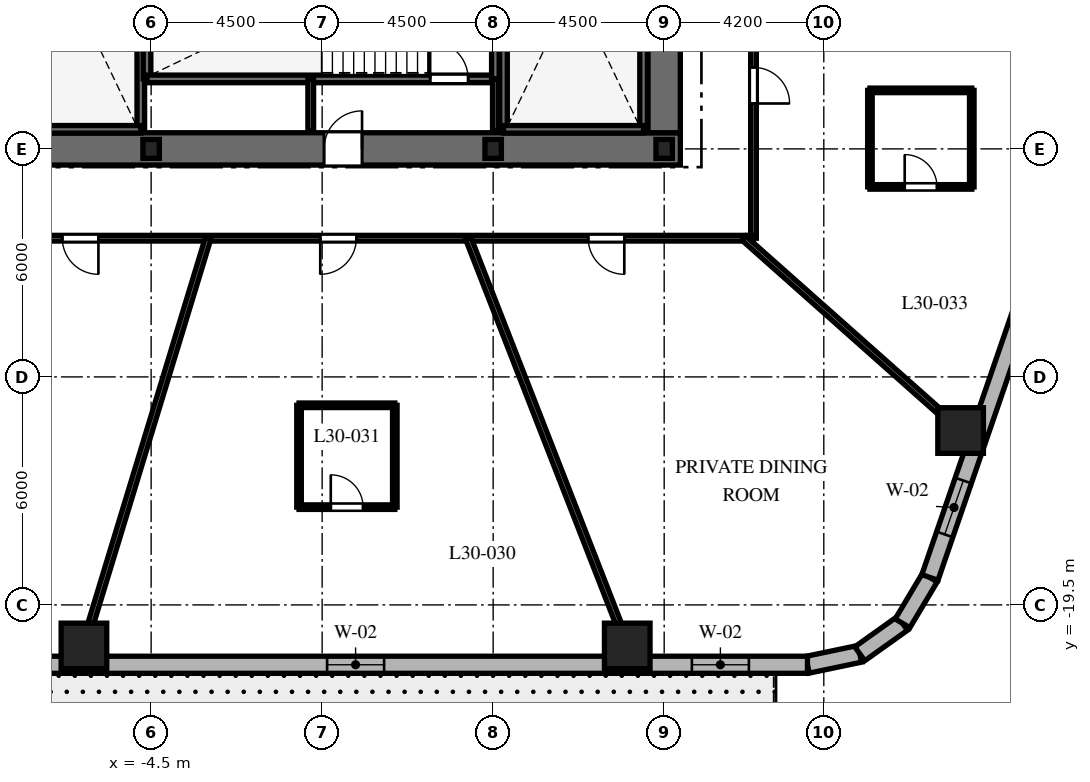
"""IFC4 building model, lengths in metres.
Left out: names, types, materials, properties, quantities, classifications, styles, units other than length and angle.
Written with IfcOpenShell. Run it as: python <this file> out.ifc"""

import sys

from ifc_helpers import new_model, si_unit, direction, frame, frame_2d, origin, origin_2d, place, context, subcontext, project, spatial, rectangle, i_section, extrude, element, fill, save


model = new_model("IFC4")
c1 = context("Model", 3, precision=1e-05, world=origin(), true_north=direction((0.0, 1.0)))
c2 = subcontext(c1, "Body", "Model", "MODEL_VIEW")
j1 = project(units=[si_unit("LENGTHUNIT", "METRE"), si_unit("PLANEANGLEUNIT", "RADIAN")], contexts=[c1])
p1 = place(None, origin())
s1 = spatial("IfcSite", under=j1, at=p1, CompositionType="ELEMENT")
p2 = place(p1, origin())
s2 = spatial("IfcBuilding", under=s1, at=p2, CompositionType="ELEMENT")
p3 = place(p2, frame((0.0, 0.0, 124.7)))
s3 = spatial("IfcBuildingStorey", under=s2, at=p3, CompositionType="ELEMENT", Elevation=124.7)
p4 = place(p3, frame((-9.425, -7.5, 0.0), z_axis=(0.0, 0.0, 1.0), x_axis=(1.0, 0.0, 0.0)))
e1 = element("IfcWall", 1, at=p4, inside=s3, PredefinedType="SHEAR", context=c2, shape_type="SweptSolid", body=[
    extrude(rectangle(XDim=18.85, YDim=0.85, at=frame_2d((9.425, 0.0))), origin(), (0.0, 0.0, 1.0), 3.7),
])
p5 = place(p4, frame((9.475, 0.0, 0.0)))
e2 = element("IfcOpeningElement", 2, at=p5, cuts=e1, PredefinedType="OPENING", context=c2, shape_type="SweptSolid", body=[
    extrude(rectangle(XDim=1.0, YDim=2.15, at=frame_2d((0.5, 1.075))), frame((0.0, 0.435, 0.0), z_axis=(0.0, -1.0, 0.0), x_axis=(1.0, 0.0, 0.0)), (0.0, 0.0, 1.0), 0.87),
])
p6 = place(p3, frame((9.0, -7.075, 0.0), z_axis=(0.0, 0.0, 1.0), x_axis=(0.0, 1.0, 0.0)))
e3 = element("IfcWall", 3, at=p6, inside=s3, PredefinedType="SHEAR", context=c2, shape_type="SweptSolid", body=[
    extrude(rectangle(XDim=14.15, YDim=0.85, at=frame_2d((7.075, 0.0))), origin(), (0.0, 0.0, 1.0), 3.7),
])
p7 = place(p6, frame((10.2, 0.0, 0.0)))
e4 = element("IfcOpeningElement", 4, at=p7, cuts=e3, PredefinedType="OPENING", context=c2, shape_type="SweptSolid", body=[
    extrude(rectangle(XDim=1.05, YDim=2.15, at=frame_2d((0.525, 1.075))), frame((0.0, 0.435, 0.0), z_axis=(0.0, -1.0, 0.0), x_axis=(1.0, 0.0, 0.0)), (0.0, 0.0, 1.0), 0.87),
])
p8 = place(p3, frame((-4.772, -6.985, 0.0), z_axis=(0.0, 0.0, 1.0), x_axis=(0.0, 1.0, 0.0)))
e5 = element("IfcWall", 5, at=p8, inside=s3, PredefinedType="SHEAR", context=c2, shape_type="SweptSolid", body=[
    extrude(rectangle(XDim=9.143, YDim=0.2, at=frame_2d((4.572, 0.0))), origin(), (0.0, 0.0, 1.0), 3.7),
])
p9 = place(p3, frame((-8.458, -6.985, 0.0), z_axis=(0.0, 0.0, 1.0), x_axis=(1.0, 0.0, 0.0)))
e6 = element("IfcWall", 6, at=p9, inside=s3, PredefinedType="SHEAR", context=c2, shape_type="SweptSolid", body=[
    extrude(rectangle(XDim=3.686, YDim=0.2, at=frame_2d((1.843, 0.0))), origin(), (0.0, 0.0, 1.0), 3.7),
])
for number, where, z_axis, x_axis in (
    (7, (4.772, -6.985, 0.0), (0.0, 0.0, 1.0), (0.0, 1.0, 0.0)),
    (8, (8.458, -6.985, 0.0), (0.0, 0.0, 1.0), (0.0, 1.0, 0.0)),
):
    element("IfcWall", number, at=place(p3, frame(where, z_axis=z_axis, x_axis=x_axis)), inside=s3, PredefinedType="SHEAR", context=c2, shape_type="SweptSolid", body=[
        extrude(rectangle(XDim=9.143, YDim=0.2, at=frame_2d((4.572, 0.0))), origin(), (0.0, 0.0, 1.0), 3.7),
    ])
for number, where, z_axis, x_axis in (
    (9, (4.772, -6.985, 0.0), (0.0, 0.0, 1.0), (1.0, 0.0, 0.0)),
    (10, (-4.608, -5.658, 0.0), (0.0, 0.0, 1.0), (0.0, 1.0, 0.0)),
):
    element("IfcWall", number, at=place(p3, frame(where, z_axis=z_axis, x_axis=x_axis)), inside=s3, PredefinedType="SHEAR", context=c2, shape_type="SweptSolid", body=[
        extrude(rectangle(XDim=3.686, YDim=0.2, at=frame_2d((1.843, 0.0))), origin(), (0.0, 0.0, 1.0), 3.7),
    ])
p10 = place(p3, frame((-4.608, -5.658, 0.0), z_axis=(0.0, 0.0, 1.0), x_axis=(1.0, 0.0, 0.0)))
e11 = element("IfcWall", 11, at=p10, inside=s3, PredefinedType="SHEAR", context=c2, shape_type="SweptSolid", body=[
    extrude(rectangle(XDim=9.166, YDim=0.2, at=frame_2d((4.583, 0.0))), origin(), (0.0, 0.0, 1.0), 3.7),
])
p11 = place(p10, frame((7.45, 0.0, 0.0)))
e12 = element("IfcOpeningElement", 12, at=p11, cuts=e11, PredefinedType="OPENING", context=c2, shape_type="SweptSolid", body=[
    extrude(rectangle(XDim=1.0, YDim=2.15, at=frame_2d((0.5, 1.075))), frame((0.0, 0.11, 0.0), z_axis=(0.0, -1.0, 0.0), x_axis=(1.0, 0.0, 0.0)), (0.0, 0.0, 1.0), 0.22),
])
p12 = place(p3, frame((4.558, -5.658, 0.0), z_axis=(0.0, 0.0, 1.0), x_axis=(0.0, 1.0, 0.0)))
e13 = element("IfcWall", 13, at=p12, inside=s3, PredefinedType="SHEAR", context=c2, shape_type="SweptSolid", body=[
    extrude(rectangle(XDim=3.686, YDim=0.2, at=frame_2d((1.843, 0.0))), origin(), (0.0, 0.0, 1.0), 3.7),
])
for number, where, z_axis, x_axis in (
    (14, (-4.5, -7.5, 0.0), (0.0, 0.0, 1.0), (1.0, 0.0, 0.0)),
    (15, (4.5, -7.5, 0.0), (0.0, 0.0, 1.0), (1.0, 0.0, 0.0)),
    (16, (9.0, -7.5, 0.0), (0.0, 0.0, 1.0), (1.0, 0.0, 0.0)),
):
    element("IfcColumn", number, at=place(p3, frame(where, z_axis=z_axis, x_axis=x_axis)), inside=s3, PredefinedType="COLUMN", context=c2, shape_type="SweptSolid", body=[
        extrude(i_section(OverallWidth=0.432, OverallDepth=0.498, WebThickness=0.056, FlangeThickness=0.089, at=origin_2d()), origin(), (0.0, 0.0, 1.0), 3.7),
    ])
for number, where, z_axis, x_axis in (
    (17, (-6.268, -20.58, 0.0), (0.0, 0.0, 1.0), (1.0, 0.0, 0.0)),
    (18, (8.028, -20.58, 0.0), (0.0, 0.0, 1.0), (1.0, 0.0, 0.0)),
    (19, (16.8, -14.911, 0.0), (0.0, 0.0, 1.0), (1.0, 0.0, 0.0)),
):
    element("IfcColumn", number, at=place(p3, frame(where, z_axis=z_axis, x_axis=x_axis)), inside=s3, PredefinedType="COLUMN", context=c2, shape_type="SweptSolid", body=[
        extrude(rectangle(XDim=1.2, YDim=1.2, at=origin_2d()), origin(), (0.0, 0.0, 1.0), 3.7),
    ])
p13 = place(p3, frame((12.771, -21.075, 0.0), z_axis=(0.0, 0.0, 1.0), x_axis=(0.97874281988, 0.205091424819, 0.0)))
e20 = element("IfcWall", 20, at=p13, inside=s3, PredefinedType="SOLIDWALL", context=c2, shape_type="SweptSolid", body=[
    extrude(rectangle(XDim=1.406, YDim=0.45, at=frame_2d((0.703, 0.0))), origin(), (0.0, 0.0, 1.0), 3.4),
])
p14 = place(p3, frame((14.146, -20.787, 0.0), z_axis=(0.0, 0.0, 1.0), x_axis=(0.814162929117, 0.580636482536, 0.0)))
e21 = element("IfcWall", 21, at=p14, inside=s3, PredefinedType="SOLIDWALL", context=c2, shape_type="SweptSolid", body=[
    extrude(rectangle(XDim=1.382, YDim=0.45, at=frame_2d((0.691, 0.0))), origin(), (0.0, 0.0, 1.0), 3.4),
])
p15 = place(p3, frame((15.272, -19.984, 0.0), z_axis=(0.0, 0.0, 1.0), x_axis=(0.512579347361, 0.858639862025, 0.0)))
e22 = element("IfcWall", 22, at=p15, inside=s3, PredefinedType="SOLIDWALL", context=c2, shape_type="SweptSolid", body=[
    extrude(rectangle(XDim=1.406, YDim=0.45, at=frame_2d((0.703, 0.0))), origin(), (0.0, 0.0, 1.0), 3.4),
])
p16 = place(p3, frame((-11.012, -21.075, 0.0), z_axis=(0.0, 0.0, 1.0), x_axis=(1.0, 0.0, 0.0)))
e23 = element("IfcWall", 23, at=p16, inside=s3, PredefinedType="SOLIDWALL", context=c2, shape_type="SweptSolid", body=[
    extrude(rectangle(XDim=23.782, YDim=0.45, at=frame_2d((11.891, 0.0))), origin(), (0.0, 0.0, 1.0), 3.4),
])
p17 = place(p16, frame((2.473, 0.0, 0.0)))
e24 = element("IfcOpeningElement", 24, at=p17, cuts=e23, PredefinedType="OPENING", context=c2, shape_type="SweptSolid", body=[
    extrude(rectangle(XDim=1.0, YDim=2.15, at=frame_2d((0.5, 1.075))), frame((0.0, 0.235, 0.0), z_axis=(0.0, -1.0, 0.0), x_axis=(1.0, 0.0, 0.0)), (0.0, 0.0, 1.0), 0.47),
])
p18 = place(p16, frame((11.142, 0.0, 0.8)))
e25 = element("IfcOpeningElement", 25, at=p18, cuts=e23, PredefinedType="OPENING", context=c2, shape_type="SweptSolid", body=[
    extrude(rectangle(XDim=1.5, YDim=1.8, at=frame_2d((0.75, 0.9))), frame((0.0, 0.235, 0.0), z_axis=(0.0, -1.0, 0.0), x_axis=(1.0, 0.0, 0.0)), (0.0, 0.0, 1.0), 0.47),
])
p19 = place(p16, frame((20.741, 0.0, 0.8)))
e26 = element("IfcOpeningElement", 26, at=p19, cuts=e23, PredefinedType="OPENING", context=c2, shape_type="SweptSolid", body=[
    extrude(rectangle(XDim=1.5, YDim=1.8, at=frame_2d((0.75, 0.9))), frame((0.0, 0.235, 0.0), z_axis=(0.0, -1.0, 0.0), x_axis=(1.0, 0.0, 0.0)), (0.0, 0.0, 1.0), 0.47),
])
p20 = place(p3, frame((15.992, -18.777, 0.0), z_axis=(0.0, 0.0, 1.0), x_axis=(0.325606988926, 0.945505202927, 0.0)))
e27 = element("IfcWall", 27, at=p20, inside=s3, PredefinedType="SOLIDWALL", context=c2, shape_type="SweptSolid", body=[
    extrude(rectangle(XDim=19.669, YDim=0.45, at=frame_2d((9.835, 0.0))), origin(), (0.0, 0.0, 1.0), 3.4),
])
p21 = place(p20, frame((1.197, 0.0, 0.8)))
e28 = element("IfcOpeningElement", 28, at=p21, cuts=e27, PredefinedType="OPENING", context=c2, shape_type="SweptSolid", body=[
    extrude(rectangle(XDim=1.5, YDim=1.8, at=frame_2d((0.75, 0.9))), frame((0.0, 0.235, 0.0), z_axis=(0.0, -1.0, 0.0), x_axis=(1.0, 0.0, 0.0)), (0.0, 0.0, 1.0), 0.47),
])
p22 = place(p20, frame((9.03, 0.0, 0.8)))
e29 = element("IfcOpeningElement", 29, at=p22, cuts=e27, PredefinedType="OPENING", context=c2, shape_type="SweptSolid", body=[
    extrude(rectangle(XDim=1.5, YDim=1.8, at=frame_2d((0.75, 0.9))), frame((0.0, 0.235, 0.0), z_axis=(0.0, -1.0, 0.0), x_axis=(1.0, 0.0, 0.0)), (0.0, 0.0, 1.0), 0.47),
])
p23 = place(p20, frame((16.918, 0.0, 0.8)))
e30 = element("IfcOpeningElement", 30, at=p23, cuts=e27, PredefinedType="OPENING", context=c2, shape_type="SweptSolid", body=[
    extrude(rectangle(XDim=1.5, YDim=1.8, at=frame_2d((0.75, 0.9))), frame((0.0, 0.235, 0.0), z_axis=(0.0, -1.0, 0.0), x_axis=(1.0, 0.0, 0.0)), (0.0, 0.0, 1.0), 0.47),
])
for number, where, z_axis, x_axis in (
    (31, (-0.3, -7.02, 0.0), (0.0, 0.0, 1.0), (0.0, 1.0, 0.0)),
    (32, (4.558, -7.02, 0.0), (0.0, 0.0, 1.0), (0.0, 1.0, 0.0)),
):
    element("IfcWall", number, at=place(p3, frame(where, z_axis=z_axis, x_axis=x_axis)), inside=s3, PredefinedType="PARTITIONING", context=c2, shape_type="SweptSolid", body=[
        extrude(rectangle(XDim=1.362, YDim=0.15, at=frame_2d((0.681, 0.0))), origin(), (0.0, 0.0, 1.0), 3.4),
    ])
p24 = place(p3, frame((11.35, 9.85, 0.0), z_axis=(0.0, 0.0, 1.0), x_axis=(0.0, -1.0, 0.0)))
e33 = element("IfcWall", 33, at=p24, inside=s3, PredefinedType="PARTITIONING", context=c2, shape_type="SweptSolid", body=[
    extrude(rectangle(XDim=19.7, YDim=0.15, at=frame_2d((9.85, 0.0))), origin(), (0.0, 0.0, 1.0), 2.84),
])
p25 = place(p24, frame((3.008, 0.0, 0.0)))
e34 = element("IfcOpeningElement", 34, at=p25, cuts=e33, PredefinedType="OPENING", context=c2, shape_type="SweptSolid", body=[
    extrude(rectangle(XDim=0.95, YDim=2.03, at=frame_2d((0.475, 1.015))), frame((0.0, 0.085, 0.0), z_axis=(0.0, -1.0, 0.0), x_axis=(1.0, 0.0, 0.0)), (0.0, 0.0, 1.0), 0.17),
])
p26 = place(p24, frame((15.205, 0.0, 0.0)))
e35 = element("IfcOpeningElement", 35, at=p26, cuts=e33, PredefinedType="OPENING", context=c2, shape_type="SweptSolid", body=[
    extrude(rectangle(XDim=0.95, YDim=2.03, at=frame_2d((0.475, 1.015))), frame((0.0, 0.085, 0.0), z_axis=(0.0, -1.0, 0.0), x_axis=(1.0, 0.0, 0.0)), (0.0, 0.0, 1.0), 0.17),
])
p27 = place(p24, frame((8.836, 0.0, 0.0)))
e36 = element("IfcOpeningElement", 36, at=p27, cuts=e33, PredefinedType="OPENING", context=c2, shape_type="SweptSolid", body=[
    extrude(rectangle(XDim=0.95, YDim=2.03, at=frame_2d((0.475, 1.015))), frame((0.0, 0.085, 0.0), z_axis=(0.0, -1.0, 0.0), x_axis=(1.0, 0.0, 0.0)), (0.0, 0.0, 1.0), 0.17),
])
p28 = place(p3, frame((11.35, -9.85, 0.0), z_axis=(0.0, 0.0, 1.0), x_axis=(-1.0, 0.0, 0.0)))
e37 = element("IfcWall", 37, at=p28, inside=s3, PredefinedType="PARTITIONING", context=c2, shape_type="SweptSolid", body=[
    extrude(rectangle(XDim=22.7, YDim=0.15, at=frame_2d((11.35, 0.0))), origin(), (0.0, 0.0, 1.0), 2.84),
])
p29 = place(p28, frame((17.237, 0.0, 0.0)))
e38 = element("IfcOpeningElement", 38, at=p29, cuts=e37, PredefinedType="OPENING", context=c2, shape_type="SweptSolid", body=[
    extrude(rectangle(XDim=0.95, YDim=2.03, at=frame_2d((0.475, 1.015))), frame((0.0, 0.085, 0.0), z_axis=(0.0, -1.0, 0.0), x_axis=(1.0, 0.0, 0.0)), (0.0, 0.0, 1.0), 0.17),
])
p30 = place(p28, frame((10.45, 0.0, 0.0)))
e39 = element("IfcOpeningElement", 39, at=p30, cuts=e37, PredefinedType="OPENING", context=c2, shape_type="SweptSolid", body=[
    extrude(rectangle(XDim=0.95, YDim=2.03, at=frame_2d((0.475, 1.015))), frame((0.0, 0.085, 0.0), z_axis=(0.0, -1.0, 0.0), x_axis=(1.0, 0.0, 0.0)), (0.0, 0.0, 1.0), 0.17),
])
p31 = place(p28, frame((3.399, 0.0, 0.0)))
e40 = element("IfcOpeningElement", 40, at=p31, cuts=e37, PredefinedType="OPENING", context=c2, shape_type="SweptSolid", body=[
    extrude(rectangle(XDim=0.95, YDim=2.03, at=frame_2d((0.475, 1.015))), frame((0.0, 0.085, 0.0), z_axis=(0.0, -1.0, 0.0), x_axis=(1.0, 0.0, 0.0)), (0.0, 0.0, 1.0), 0.17),
])
p32 = place(p3, frame((-3.0, -9.85, 0.0), z_axis=(0.0, 0.0, 1.0), x_axis=(-0.291352035382, -0.95661590593, 0.0)))
e41 = element("IfcWall", 41, at=p32, inside=s3, PredefinedType="PARTITIONING", context=c2, shape_type="SweptSolid", body=[
    extrude(rectangle(XDim=11.734, YDim=0.15, at=frame_2d((5.867, 0.0))), origin(), (0.0, 0.0, 1.0), 2.54),
])
p33 = place(p3, frame((3.842, -9.85, 0.0), z_axis=(0.0, 0.0, 1.0), x_axis=(0.363432685593, -0.931620460833, 0.0)))
e42 = element("IfcWall", 42, at=p33, inside=s3, PredefinedType="PARTITIONING", context=c2, shape_type="SweptSolid", body=[
    extrude(rectangle(XDim=12.049, YDim=0.15, at=frame_2d((6.024, 0.0))), origin(), (0.0, 0.0, 1.0), 2.54),
])
p34 = place(p3, frame((11.098, -9.85, 0.0), z_axis=(0.0, 0.0, 1.0), x_axis=(0.747904295103, -0.663806572253, 0.0)))
e43 = element("IfcWall", 43, at=p34, inside=s3, PredefinedType="PARTITIONING", context=c2, shape_type="SweptSolid", body=[
    extrude(rectangle(XDim=8.16, YDim=0.15, at=frame_2d((4.08, 0.0))), origin(), (0.0, 0.0, 1.0), 2.54),
])
p35 = place(p3, frame((-0.608, -16.927, 0.0), z_axis=(0.0, 0.0, 1.0), x_axis=(1.0, 0.0, 0.0)))
e44 = element("IfcWall", 44, at=p35, inside=s3, PredefinedType="PARTITIONING", context=c2, shape_type="SweptSolid", body=[
    extrude(rectangle(XDim=2.52, YDim=0.12, at=frame_2d((1.26, 0.0))), origin(), (0.0, 0.0, 1.0), 3.4),
])
p36 = place(p35, frame((0.835, 0.0, 0.0)))
e45 = element("IfcOpeningElement", 45, at=p36, cuts=e44, PredefinedType="OPENING", context=c2, shape_type="SweptSolid", body=[
    extrude(rectangle(XDim=0.85, YDim=2.03, at=frame_2d((0.425, 1.015))), frame((0.0, 0.07, 0.0), z_axis=(0.0, -1.0, 0.0), x_axis=(1.0, 0.0, 0.0)), (0.0, 0.0, 1.0), 0.14),
])
p37 = place(p3, frame((1.912, -16.927, 0.0), z_axis=(0.0, 0.0, 1.0), x_axis=(0.0, 1.0, 0.0)))
e46 = element("IfcWall", 46, at=p37, inside=s3, PredefinedType="PARTITIONING", context=c2, shape_type="SweptSolid", body=[
    extrude(rectangle(XDim=2.68, YDim=0.12, at=frame_2d((1.34, 0.0))), origin(), (0.0, 0.0, 1.0), 2.84),
])
p38 = place(p3, frame((1.912, -14.247, 0.0), z_axis=(0.0, 0.0, 1.0), x_axis=(-1.0, 0.0, 0.0)))
e47 = element("IfcWall", 47, at=p38, inside=s3, PredefinedType="PARTITIONING", context=c2, shape_type="SweptSolid", body=[
    extrude(rectangle(XDim=2.52, YDim=0.12, at=frame_2d((1.26, 0.0))), origin(), (0.0, 0.0, 1.0), 3.4),
])
p39 = place(p3, frame((-0.608, -14.247, 0.0), z_axis=(0.0, 0.0, 1.0), x_axis=(0.0, -1.0, 0.0)))
e48 = element("IfcWall", 48, at=p39, inside=s3, PredefinedType="PARTITIONING", context=c2, shape_type="SweptSolid", body=[
    extrude(rectangle(XDim=2.68, YDim=0.12, at=frame_2d((1.34, 0.0))), origin(), (0.0, 0.0, 1.0), 2.84),
])
p40 = place(p3, frame((14.414, -8.5, 0.0), z_axis=(0.0, 0.0, 1.0), x_axis=(1.0, 0.0, 0.0)))
e49 = element("IfcWall", 49, at=p40, inside=s3, PredefinedType="PARTITIONING", context=c2, shape_type="SweptSolid", body=[
    extrude(rectangle(XDim=2.68, YDim=0.12, at=frame_2d((1.34, 0.0))), origin(), (0.0, 0.0, 1.0), 2.972),
])
p41 = place(p40, frame((0.915, 0.0, 0.0)))
e50 = element("IfcOpeningElement", 50, at=p41, cuts=e49, PredefinedType="OPENING", context=c2, shape_type="SweptSolid", body=[
    extrude(rectangle(XDim=0.85, YDim=2.03, at=frame_2d((0.425, 1.015))), frame((0.0, 0.07, 0.0), z_axis=(0.0, -1.0, 0.0), x_axis=(1.0, 0.0, 0.0)), (0.0, 0.0, 1.0), 0.14),
])
p42 = place(p3, frame((17.094, -8.5, 0.0), z_axis=(0.0, 0.0, 1.0), x_axis=(0.0, 1.0, 0.0)))
e51 = element("IfcWall", 51, at=p42, inside=s3, PredefinedType="PARTITIONING", context=c2, shape_type="SweptSolid", body=[
    extrude(rectangle(XDim=2.54, YDim=0.12, at=frame_2d((1.27, 0.0))), origin(), (0.0, 0.0, 1.0), 3.4),
])
p43 = place(p3, frame((17.094, -5.96, 0.0), z_axis=(0.0, 0.0, 1.0), x_axis=(-1.0, 0.0, 0.0)))
e52 = element("IfcWall", 52, at=p43, inside=s3, PredefinedType="PARTITIONING", context=c2, shape_type="SweptSolid", body=[
    extrude(rectangle(XDim=2.68, YDim=0.12, at=frame_2d((1.34, 0.0))), origin(), (0.0, 0.0, 1.0), 2.972),
])
p44 = place(p3, frame((14.414, -5.96, 0.0), z_axis=(0.0, 0.0, 1.0), x_axis=(0.0, -1.0, 0.0)))
e53 = element("IfcWall", 53, at=p44, inside=s3, PredefinedType="PARTITIONING", context=c2, shape_type="SweptSolid", body=[
    extrude(rectangle(XDim=2.54, YDim=0.12, at=frame_2d((1.27, 0.0))), origin(), (0.0, 0.0, 1.0), 3.4),
])
p45 = place(p18, origin())
e54 = element("IfcWindow", 54, at=p45, inside=s3, PartitioningType="SINGLE_PANEL", PredefinedType="WINDOW", context=c2, shape_type="SweptSolid", body=[
    extrude(rectangle(XDim=1.5, YDim=1.8, at=frame_2d((0.75, 0.9))), frame((0.0, 0.03, 0.0), z_axis=(0.0, -1.0, 0.0), x_axis=(1.0, 0.0, 0.0)), (0.0, 0.0, 1.0), 0.06),
])
fill(e25, e54)
p46 = place(p19, origin())
e55 = element("IfcWindow", 55, at=p46, inside=s3, PartitioningType="SINGLE_PANEL", PredefinedType="WINDOW", context=c2, shape_type="SweptSolid", body=[
    extrude(rectangle(XDim=1.5, YDim=1.8, at=frame_2d((0.75, 0.9))), frame((0.0, 0.03, 0.0), z_axis=(0.0, -1.0, 0.0), x_axis=(1.0, 0.0, 0.0)), (0.0, 0.0, 1.0), 0.06),
])
fill(e26, e55)
p47 = place(p21, origin())
e56 = element("IfcWindow", 56, at=p47, inside=s3, PartitioningType="SINGLE_PANEL", PredefinedType="WINDOW", context=c2, shape_type="SweptSolid", body=[
    extrude(rectangle(XDim=1.5, YDim=1.8, at=frame_2d((0.75, 0.9))), frame((0.0, 0.03, 0.0), z_axis=(0.0, -1.0, 0.0), x_axis=(1.0, 0.0, 0.0)), (0.0, 0.0, 1.0), 0.06),
])
fill(e28, e56)
p48 = place(p11, origin())
e57 = element("IfcDoor", 57, at=p48, inside=s3, OperationType="SINGLE_SWING_LEFT", PredefinedType="DOOR", context=c2, shape_type="SweptSolid", body=[
    extrude(rectangle(XDim=1.0, YDim=2.15, at=frame_2d((0.5, 1.075))), frame((0.0, 0.025, 0.0), z_axis=(0.0, -1.0, 0.0), x_axis=(1.0, 0.0, 0.0)), (0.0, 0.0, 1.0), 0.05),
])
fill(e12, e57)
p49 = place(p5, origin())
e58 = element("IfcDoor", 58, at=p49, inside=s3, OperationType="SINGLE_SWING_RIGHT", PredefinedType="DOOR", context=c2, shape_type="SweptSolid", body=[
    extrude(rectangle(XDim=1.0, YDim=2.15, at=frame_2d((0.5, 1.075))), frame((0.0, 0.025, 0.0), z_axis=(0.0, -1.0, 0.0), x_axis=(1.0, 0.0, 0.0)), (0.0, 0.0, 1.0), 0.05),
])
fill(e2, e58)
p50 = place(p29, origin())
e59 = element("IfcDoor", 59, at=p50, inside=s3, OperationType="SINGLE_SWING_LEFT", PredefinedType="DOOR", context=c2, shape_type="SweptSolid", body=[
    extrude(rectangle(XDim=0.95, YDim=2.03, at=frame_2d((0.475, 1.015))), frame((0.0, 0.025, 0.0), z_axis=(0.0, -1.0, 0.0), x_axis=(1.0, 0.0, 0.0)), (0.0, 0.0, 1.0), 0.05),
])
fill(e38, e59)
p51 = place(p30, origin())
e60 = element("IfcDoor", 60, at=p51, inside=s3, OperationType="SINGLE_SWING_RIGHT", PredefinedType="DOOR", context=c2, shape_type="SweptSolid", body=[
    extrude(rectangle(XDim=0.95, YDim=2.03, at=frame_2d((0.475, 1.015))), frame((0.0, 0.025, 0.0), z_axis=(0.0, -1.0, 0.0), x_axis=(1.0, 0.0, 0.0)), (0.0, 0.0, 1.0), 0.05),
])
fill(e39, e60)
p52 = place(p36, origin())
e61 = element("IfcDoor", 61, at=p52, inside=s3, OperationType="SINGLE_SWING_LEFT", PredefinedType="DOOR", context=c2, shape_type="SweptSolid", body=[
    extrude(rectangle(XDim=0.85, YDim=2.03, at=frame_2d((0.425, 1.015))), frame((0.0, 0.025, 0.0), z_axis=(0.0, -1.0, 0.0), x_axis=(1.0, 0.0, 0.0)), (0.0, 0.0, 1.0), 0.05),
])
fill(e45, e61)
p53 = place(p31, origin())
e62 = element("IfcDoor", 62, at=p53, inside=s3, OperationType="SINGLE_SWING_LEFT", PredefinedType="DOOR", context=c2, shape_type="SweptSolid", body=[
    extrude(rectangle(XDim=0.95, YDim=2.03, at=frame_2d((0.475, 1.015))), frame((0.0, 0.025, 0.0), z_axis=(0.0, -1.0, 0.0), x_axis=(1.0, 0.0, 0.0)), (0.0, 0.0, 1.0), 0.05),
])
fill(e40, e62)
p54 = place(p26, origin())
e63 = element("IfcDoor", 63, at=p54, inside=s3, OperationType="SINGLE_SWING_RIGHT", PredefinedType="DOOR", context=c2, shape_type="SweptSolid", body=[
    extrude(rectangle(XDim=0.95, YDim=2.03, at=frame_2d((0.475, 1.015))), frame((0.0, 0.025, 0.0), z_axis=(0.0, -1.0, 0.0), x_axis=(1.0, 0.0, 0.0)), (0.0, 0.0, 1.0), 0.05),
])
fill(e35, e63)
p55 = place(p41, origin())
e64 = element("IfcDoor", 64, at=p55, inside=s3, OperationType="SINGLE_SWING_LEFT", PredefinedType="DOOR", context=c2, shape_type="SweptSolid", body=[
    extrude(rectangle(XDim=0.85, YDim=2.03, at=frame_2d((0.425, 1.015))), frame((0.0, 0.025, 0.0), z_axis=(0.0, -1.0, 0.0), x_axis=(1.0, 0.0, 0.0)), (0.0, 0.0, 1.0), 0.05),
])
fill(e50, e64)
save(model, sys.argv[1])
